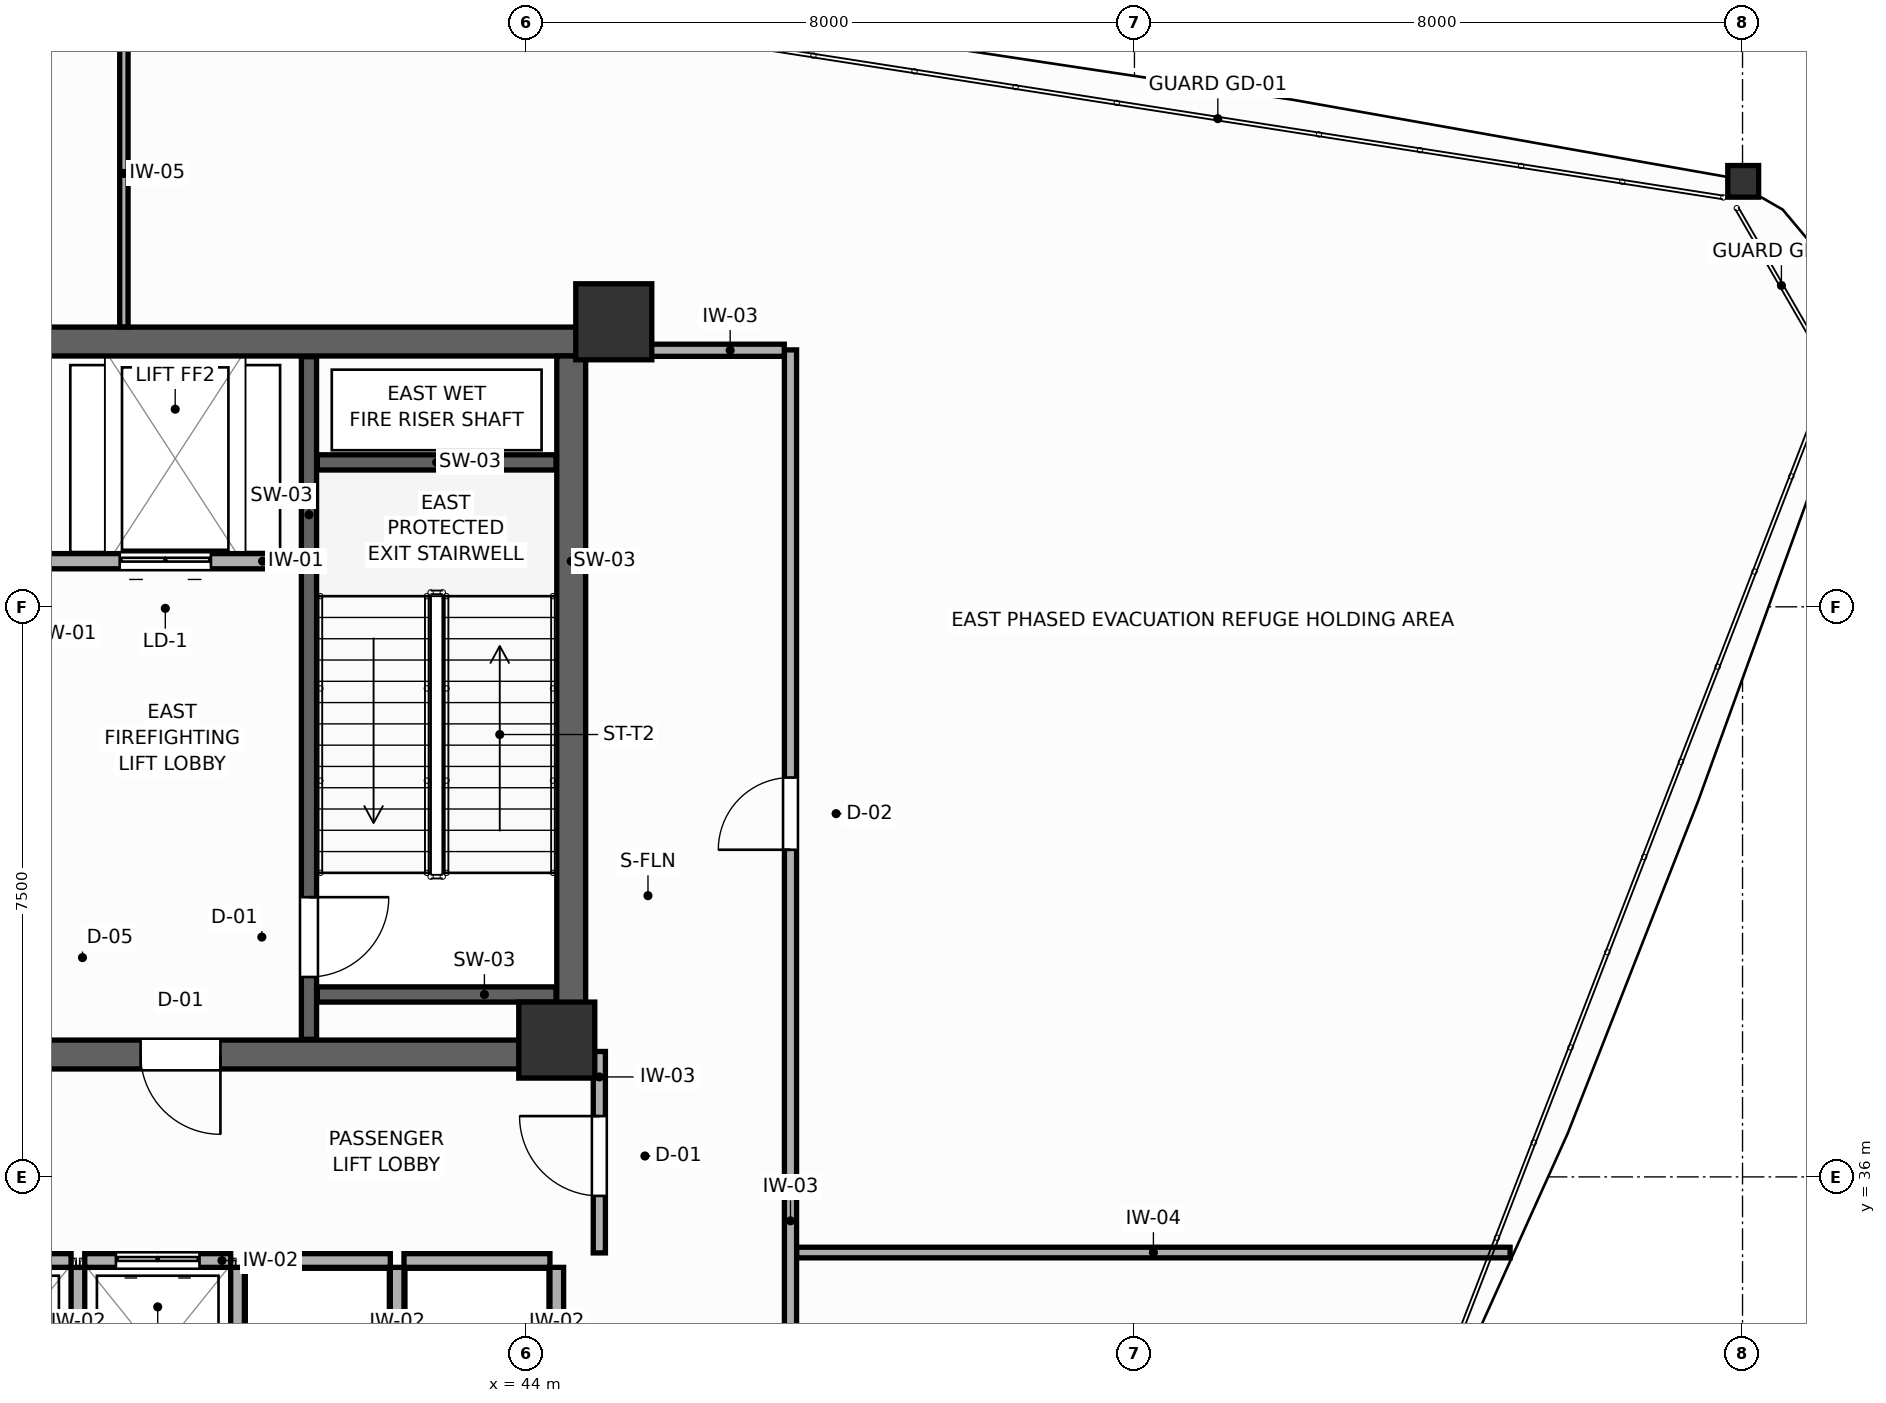
"""IFC4 building model, lengths in metres.
Left out: names, types, materials, properties, quantities, classifications, styles, units other than length and angle.
Written with IfcOpenShell. Run it as: python <this file> out.ifc"""

import sys

from ifc_helpers import new_model, si_unit, direction, frame, frame_2d, origin, origin_2d, place, context, subcontext, project, spatial, rectangle, i_section, extrude, source, transform, mapped, element, fill, save


model = new_model("IFC4")
c1 = context("Model", 3, precision=1e-05, world=origin(), true_north=direction((0.0, 1.0)))
c2 = subcontext(c1, "Body", "Model", "MODEL_VIEW")
j1 = project(units=[si_unit("LENGTHUNIT", "METRE"), si_unit("PLANEANGLEUNIT", "RADIAN")], contexts=[c1])
p1 = place(None, origin())
s1 = spatial("IfcSite", under=j1, at=p1, CompositionType="ELEMENT")
p2 = place(p1, origin())
s2 = spatial("IfcBuilding", under=s1, at=p2, CompositionType="ELEMENT")
p3 = place(p2, frame((0.0, 0.0, 238.2)))
s3 = spatial("IfcBuildingStorey", under=s2, at=p3, CompositionType="ELEMENT", Elevation=238.2)
p4 = place(p3, frame((27.22, 46.99, 0.0), z_axis=(0.0, 0.0, 1.0), x_axis=(1.0, 0.0, 0.0)))
e1 = element("IfcWall", 1, at=p4, inside=s3, PredefinedType="SHEAR", context=c2, shape_type="SweptSolid", body=[
    extrude(rectangle(XDim=17.56, YDim=0.38, at=frame_2d((8.78, 0.0))), origin(), (0.0, 0.0, 1.0), 4.8),
])
p5 = place(p3, frame((27.22, 37.61, 0.0), z_axis=(0.0, 0.0, 1.0), x_axis=(1.0, 0.0, 0.0)))
e2 = element("IfcWall", 2, at=p5, inside=s3, PredefinedType="SHEAR", context=c2, shape_type="SweptSolid", body=[
    extrude(rectangle(XDim=17.56, YDim=0.38, at=frame_2d((8.78, 0.0))), origin(), (0.0, 0.0, 1.0), 4.8),
])
p6 = place(p5, frame((4.805, 0.0, 0.0)))
e3 = element("IfcOpeningElement", 3, at=p6, cuts=e2, PredefinedType="OPENING", context=c2, shape_type="SweptSolid", body=[
    extrude(rectangle(XDim=1.05, YDim=2.1, at=frame_2d((0.525, 1.05))), frame((0.0, 0.2, 0.0), z_axis=(0.0, -1.0, 0.0), x_axis=(1.0, 0.0, 0.0)), (0.0, 0.0, 1.0), 0.4),
])
p7 = place(p5, frame((11.705, 0.0, 0.0)))
e4 = element("IfcOpeningElement", 4, at=p7, cuts=e2, PredefinedType="OPENING", context=c2, shape_type="SweptSolid", body=[
    extrude(rectangle(XDim=1.05, YDim=2.1, at=frame_2d((0.525, 1.05))), frame((0.0, 0.2, 0.0), z_axis=(0.0, -1.0, 0.0), x_axis=(1.0, 0.0, 0.0)), (0.0, 0.0, 1.0), 0.4),
])
p8 = place(p3, frame((44.59, 37.8, 0.0), z_axis=(0.0, 0.0, 1.0), x_axis=(0.0, 1.0, 0.0)))
e5 = element("IfcWall", 5, at=p8, inside=s3, PredefinedType="SHEAR", context=c2, shape_type="SweptSolid", body=[
    extrude(rectangle(XDim=9.0, YDim=0.38, at=frame_2d((4.5, 0.0))), origin(), (0.0, 0.0, 1.0), 4.8),
])
m1 = source(origin(), c2, "Body", "SweptSolid", [
    extrude(rectangle(XDim=1.0, YDim=1.0, at=origin_2d()), origin(), (0.0, 0.0, 1.0), 4.8),
])
for number, where, z_axis, x_axis in (
    (6, (45.15, 47.25, 0.0), (0.0, 0.0, 1.0), (1.0, 0.0, 0.0)),
    (7, (44.4, 37.8, 0.0), (0.0, 0.0, 1.0), (1.0, 0.0, 0.0)),
):
    element("IfcColumn", number, at=place(p3, frame(where, z_axis=z_axis, x_axis=x_axis)), inside=s3, PredefinedType="COLUMN", context=c2, shape_type="MappedRepresentation", body=[
        mapped(m1, transform((0.0, 0.0, 0.0), scale=1.0)),
    ])
m2 = source(origin(), c2, "Body", "SweptSolid", [
    extrude(i_section(OverallWidth=0.406, OverallDepth=0.416, WebThickness=0.027, FlangeThickness=0.044, FilletRadius=0.015, at=origin_2d()), origin(), (0.0, 0.0, 1.0), 4.8),
])
p9 = place(p3, frame((60.009, 49.098, 0.0), z_axis=(0.0, 0.0, 1.0), x_axis=(1.0, 0.0, 0.0)))
e8 = element("IfcColumn", 8, at=p9, inside=s3, PredefinedType="COLUMN", context=c2, shape_type="MappedRepresentation", body=[
    mapped(m2, transform((0.0, 0.0, 0.0), scale=1.0)),
])
p10 = place(p3, frame((41.14, 37.81, 0.0), z_axis=(0.0, 0.0, 1.0), x_axis=(0.0, 1.0, 0.0)))
e9 = element("IfcWall", 9, at=p10, inside=s3, PredefinedType="SHEAR", context=c2, shape_type="SweptSolid", body=[
    extrude(rectangle(XDim=8.98, YDim=0.2, at=frame_2d((4.49, 0.0))), origin(), (0.0, 0.0, 1.0), 4.8),
])
p11 = place(p10, frame((0.82, 0.0, 0.0)))
e10 = element("IfcOpeningElement", 10, at=p11, cuts=e9, PredefinedType="OPENING", context=c2, shape_type="SweptSolid", body=[
    extrude(rectangle(XDim=1.05, YDim=2.1, at=frame_2d((0.525, 1.05))), frame((0.0, 0.11, 0.0), z_axis=(0.0, -1.0, 0.0), x_axis=(1.0, 0.0, 0.0)), (0.0, 0.0, 1.0), 0.22),
])
for number, where, z_axis, x_axis in (
    (11, (41.25, 45.4, 0.0), (0.0, 0.0, 1.0), (1.0, 0.0, 0.0)),
    (12, (41.25, 38.4, 0.0), (0.0, 0.0, 1.0), (1.0, 0.0, 0.0)),
):
    element("IfcWall", number, at=place(p3, frame(where, z_axis=z_axis, x_axis=x_axis)), inside=s3, PredefinedType="SHEAR", context=c2, shape_type="SweptSolid", body=[
        extrude(rectangle(XDim=3.14, YDim=0.2, at=frame_2d((1.57, 0.0))), origin(), (0.0, 0.0, 1.0), 4.8),
    ])
p12 = place(p3, frame((37.65, 44.1, 0.0), z_axis=(0.0, 0.0, 1.0), x_axis=(1.0, 0.0, 0.0)))
e13 = element("IfcWall", 13, at=p12, inside=s3, PredefinedType="PARTITIONING", context=c2, shape_type="SweptSolid", body=[
    extrude(rectangle(XDim=3.38, YDim=0.2, at=frame_2d((1.69, 0.0))), origin(), (0.0, 0.0, 1.0), 4.61),
])
p13 = place(p12, frame((1.0, 0.0, 0.0)))
e14 = element("IfcOpeningElement", 14, at=p13, cuts=e13, PredefinedType="OPENING", context=c2, shape_type="SweptSolid", body=[
    extrude(rectangle(XDim=1.2, YDim=2.1, at=frame_2d((0.6, 1.05))), frame((0.0, 0.11, 0.0), z_axis=(0.0, -1.0, 0.0), x_axis=(1.0, 0.0, 0.0)), (0.0, 0.0, 1.0), 0.22),
])
p14 = place(p3, frame((36.09, 34.9, 0.0), z_axis=(0.0, 0.0, 1.0), x_axis=(1.0, 0.0, 0.0)))
e15 = element("IfcWall", 15, at=p14, inside=s3, PredefinedType="PARTITIONING", context=c2, shape_type="SweptSolid", body=[
    extrude(rectangle(XDim=1.92, YDim=0.18, at=frame_2d((0.96, 0.0))), origin(), (0.0, 0.0, 1.0), 4.61),
])
p15 = place(p14, frame((0.41, 0.0, 0.0)))
e16 = element("IfcOpeningElement", 16, at=p15, cuts=e15, PredefinedType="OPENING", context=c2, shape_type="SweptSolid", body=[
    extrude(rectangle(XDim=1.1, YDim=2.1, at=frame_2d((0.55, 1.05))), frame((0.0, 0.1, 0.0), z_axis=(0.0, -1.0, 0.0), x_axis=(1.0, 0.0, 0.0)), (0.0, 0.0, 1.0), 0.2),
])
p16 = place(p3, frame((38.19, 34.9, 0.0), z_axis=(0.0, 0.0, 1.0), x_axis=(1.0, 0.0, 0.0)))
e17 = element("IfcWall", 17, at=p16, inside=s3, PredefinedType="PARTITIONING", context=c2, shape_type="SweptSolid", body=[
    extrude(rectangle(XDim=1.92, YDim=0.18, at=frame_2d((0.96, 0.0))), origin(), (0.0, 0.0, 1.0), 4.61),
])
p17 = place(p16, frame((0.41, 0.0, 0.0)))
e18 = element("IfcOpeningElement", 18, at=p17, cuts=e17, PredefinedType="OPENING", context=c2, shape_type="SweptSolid", body=[
    extrude(rectangle(XDim=1.1, YDim=2.1, at=frame_2d((0.55, 1.05))), frame((0.0, 0.1, 0.0), z_axis=(0.0, -1.0, 0.0), x_axis=(1.0, 0.0, 0.0)), (0.0, 0.0, 1.0), 0.2),
])
p18 = place(p3, frame((38.1, 32.49, 0.0), z_axis=(0.0, 0.0, 1.0), x_axis=(0.0, 1.0, 0.0)))
e19 = element("IfcWall", 19, at=p18, inside=s3, PredefinedType="PARTITIONING", context=c2, shape_type="SweptSolid", body=[
    extrude(rectangle(XDim=2.32, YDim=0.18, at=frame_2d((1.16, 0.0))), origin(), (0.0, 0.0, 1.0), 4.61),
])
p19 = place(p3, frame((40.29, 34.9, 0.0), z_axis=(0.0, 0.0, 1.0), x_axis=(1.0, 0.0, 0.0)))
e20 = element("IfcWall", 20, at=p19, inside=s3, PredefinedType="PARTITIONING", context=c2, shape_type="SweptSolid", body=[
    extrude(rectangle(XDim=1.92, YDim=0.18, at=frame_2d((0.96, 0.0))), origin(), (0.0, 0.0, 1.0), 4.61),
])
p20 = place(p3, frame((40.2, 32.49, 0.0), z_axis=(0.0, 0.0, 1.0), x_axis=(0.0, 1.0, 0.0)))
e21 = element("IfcWall", 21, at=p20, inside=s3, PredefinedType="PARTITIONING", context=c2, shape_type="SweptSolid", body=[
    extrude(rectangle(XDim=2.32, YDim=0.18, at=frame_2d((1.16, 0.0))), origin(), (0.0, 0.0, 1.0), 4.61),
])
p21 = place(p3, frame((42.39, 34.9, 0.0), z_axis=(0.0, 0.0, 1.0), x_axis=(1.0, 0.0, 0.0)))
e22 = element("IfcWall", 22, at=p21, inside=s3, PredefinedType="PARTITIONING", context=c2, shape_type="SweptSolid", body=[
    extrude(rectangle(XDim=1.92, YDim=0.18, at=frame_2d((0.96, 0.0))), origin(), (0.0, 0.0, 1.0), 4.61),
])
for number, where, z_axis, x_axis in (
    (23, (42.3, 32.49, 0.0), (0.0, 0.0, 1.0), (0.0, 1.0, 0.0)),
    (24, (44.4, 32.49, 0.0), (0.0, 0.0, 1.0), (0.0, 1.0, 0.0)),
):
    element("IfcWall", number, at=place(p3, frame(where, z_axis=z_axis, x_axis=x_axis)), inside=s3, PredefinedType="PARTITIONING", context=c2, shape_type="SweptSolid", body=[
        extrude(rectangle(XDim=2.32, YDim=0.18, at=frame_2d((1.16, 0.0))), origin(), (0.0, 0.0, 1.0), 4.61),
    ])
p22 = place(p3, frame((44.96, 35.0, 0.0), z_axis=(0.0, 0.0, 1.0), x_axis=(0.0, 1.0, 0.0)))
e25 = element("IfcWall", 25, at=p22, inside=s3, PredefinedType="PARTITIONING", context=c2, shape_type="SweptSolid", body=[
    extrude(rectangle(XDim=2.65, YDim=0.16, at=frame_2d((1.325, 0.0))), origin(), (0.0, 0.0, 1.0), 4.61),
])
p23 = place(p22, frame((0.75, 0.0, 0.0)))
e26 = element("IfcOpeningElement", 26, at=p23, cuts=e25, PredefinedType="OPENING", context=c2, shape_type="SweptSolid", body=[
    extrude(rectangle(XDim=1.05, YDim=2.1, at=frame_2d((0.525, 1.05))), frame((0.0, 0.09, 0.0), z_axis=(0.0, -1.0, 0.0), x_axis=(1.0, 0.0, 0.0)), (0.0, 0.0, 1.0), 0.18),
])
p24 = place(p3, frame((47.475, 30.72, 0.0), z_axis=(0.0, 0.0, 1.0), x_axis=(0.0, 1.0, 0.0)))
e27 = element("IfcWall", 27, at=p24, inside=s3, PredefinedType="PARTITIONING", context=c2, shape_type="SweptSolid", body=[
    extrude(rectangle(XDim=16.16, YDim=0.16, at=frame_2d((8.08, 0.0))), origin(), (0.0, 0.0, 1.0), 4.61),
])
p25 = place(p24, frame((9.584, 0.0, 0.0)))
e28 = element("IfcOpeningElement", 28, at=p25, cuts=e27, PredefinedType="OPENING", context=c2, shape_type="SweptSolid", body=[
    extrude(rectangle(XDim=0.95, YDim=2.05, at=frame_2d((0.475, 1.025))), frame((0.0, 0.09, 0.0), z_axis=(0.0, -1.0, 0.0), x_axis=(1.0, 0.0, 0.0)), (0.0, 0.0, 1.0), 0.18),
])
p26 = place(p3, frame((45.02, 46.875, 0.0), z_axis=(0.0, 0.0, 1.0), x_axis=(1.0, 0.0, 0.0)))
e29 = element("IfcWall", 29, at=p26, inside=s3, PredefinedType="PARTITIONING", context=c2, shape_type="SweptSolid", body=[
    extrude(rectangle(XDim=2.373, YDim=0.16, at=frame_2d((1.187, 0.0))), origin(), (0.0, 0.0, 1.0), 2.57),
])
p27 = place(p3, frame((47.557, 35.005, 0.0), z_axis=(0.0, 0.0, 1.0), x_axis=(1.0, 0.0, 0.0)))
e30 = element("IfcWall", 30, at=p27, inside=s3, PredefinedType="PARTITIONING", context=c2, shape_type="SweptSolid", body=[
    extrude(rectangle(XDim=9.385, YDim=0.14, at=frame_2d((4.692, 0.0))), origin(), (0.0, 0.0, 1.0), 4.61),
])
p28 = place(p3, frame((38.705, 47.182, 0.0), z_axis=(0.0, 0.0, 1.0), x_axis=(0.0, 1.0, 0.0)))
e31 = element("IfcWall", 31, at=p28, inside=s3, PredefinedType="MOVABLE", context=c2, shape_type="SweptSolid", body=[
    extrude(rectangle(XDim=4.039, YDim=0.11, at=frame_2d((2.02, 0.0))), origin(), (0.0, 0.0, 1.0), 4.61),
])
p29 = place(p11, frame((1.05, 0.0, 0.0), z_axis=(0.0, 0.0, 1.0), x_axis=(-1.0, 0.0, 0.0)))
e32 = element("IfcDoor", 32, at=p29, inside=s3, OperationType="SINGLE_SWING_LEFT", PredefinedType="DOOR", context=c2, shape_type="SweptSolid", body=[
    extrude(rectangle(XDim=1.05, YDim=2.1, at=frame_2d((0.525, 1.05))), frame((0.0, 0.025, 0.0), z_axis=(0.0, -1.0, 0.0), x_axis=(1.0, 0.0, 0.0)), (0.0, 0.0, 1.0), 0.05),
])
fill(e10, e32)
p30 = place(p13, origin())
e33 = element("IfcDoor", 33, at=p30, inside=s3, OperationType="DOUBLE_DOOR_SLIDING", PredefinedType="DOOR", context=c2, shape_type="SweptSolid", body=[
    extrude(rectangle(XDim=1.2, YDim=2.1, at=frame_2d((0.6, 1.05))), frame((0.0, 0.025, 0.0), z_axis=(0.0, -1.0, 0.0), x_axis=(1.0, 0.0, 0.0)), (0.0, 0.0, 1.0), 0.05),
])
fill(e14, e33)
p31 = place(p17, origin())
e34 = element("IfcDoor", 34, at=p31, inside=s3, OperationType="DOUBLE_DOOR_SLIDING", PredefinedType="DOOR", context=c2, shape_type="SweptSolid", body=[
    extrude(rectangle(XDim=1.1, YDim=2.1, at=frame_2d((0.55, 1.05))), frame((0.0, 0.025, 0.0), z_axis=(0.0, -1.0, 0.0), x_axis=(1.0, 0.0, 0.0)), (0.0, 0.0, 1.0), 0.05),
])
fill(e18, e34)
p32 = place(p23, origin())
e35 = element("IfcDoor", 35, at=p32, inside=s3, OperationType="SINGLE_SWING_RIGHT", PredefinedType="DOOR", context=c2, shape_type="SweptSolid", body=[
    extrude(rectangle(XDim=1.05, YDim=2.1, at=frame_2d((0.525, 1.05))), frame((0.0, 0.025, 0.0), z_axis=(0.0, -1.0, 0.0), x_axis=(1.0, 0.0, 0.0)), (0.0, 0.0, 1.0), 0.05),
])
fill(e26, e35)
p33 = place(p25, origin())
e36 = element("IfcDoor", 36, at=p33, inside=s3, OperationType="SINGLE_SWING_LEFT", PredefinedType="DOOR", context=c2, shape_type="SweptSolid", body=[
    extrude(rectangle(XDim=0.95, YDim=2.05, at=frame_2d((0.475, 1.025))), frame((0.0, 0.025, 0.0), z_axis=(0.0, -1.0, 0.0), x_axis=(1.0, 0.0, 0.0)), (0.0, 0.0, 1.0), 0.05),
])
fill(e28, e36)
p34 = place(p7, frame((1.05, 0.0, 0.0), z_axis=(0.0, 0.0, 1.0), x_axis=(-1.0, 0.0, 0.0)))
e37 = element("IfcDoor", 37, at=p34, inside=s3, OperationType="SINGLE_SWING_LEFT", PredefinedType="DOOR", context=c2, shape_type="SweptSolid", body=[
    extrude(rectangle(XDim=1.05, YDim=2.1, at=frame_2d((0.525, 1.05))), frame((0.0, 0.025, 0.0), z_axis=(0.0, -1.0, 0.0), x_axis=(1.0, 0.0, 0.0)), (0.0, 0.0, 1.0), 0.05),
])
fill(e4, e37)
save(model, sys.argv[1])
